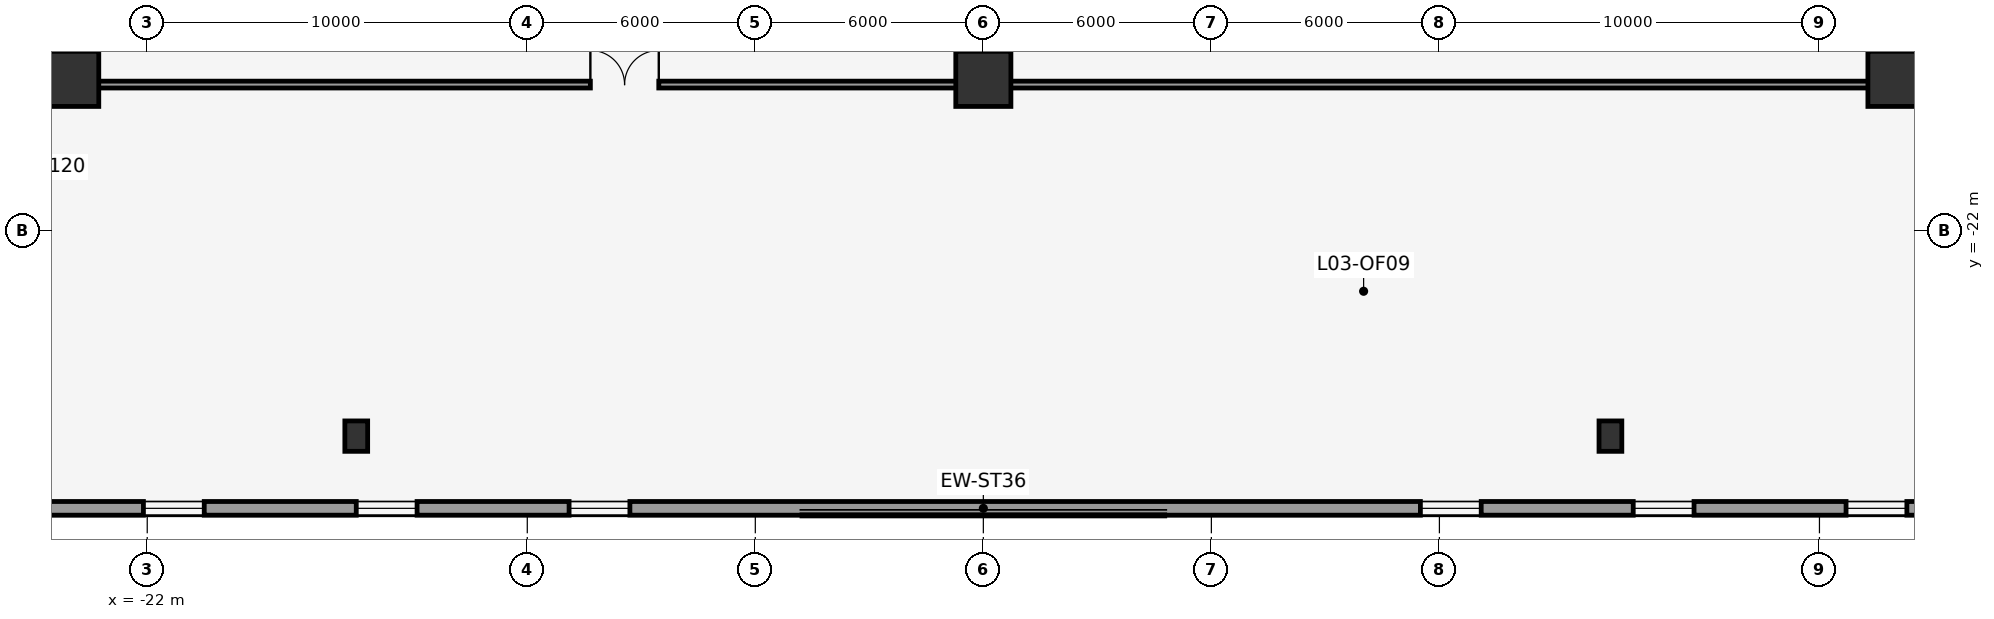
"""IFC4 building model, lengths in metres.
Left out: names, types, materials, properties, quantities, classifications, styles, units other than length and angle.
Written with IfcOpenShell. Run it as: python <this file> out.ifc"""

import sys

from ifc_helpers import new_model, si_unit, direction, frame, frame_2d, origin, origin_2d, place, context, subcontext, project, spatial, rectangle, hollow_rectangle, extrude, element, fill, save


model = new_model("IFC4")
c1 = context("Model", 3, precision=1e-05, world=origin(), true_north=direction((0.0, 1.0)))
c2 = subcontext(c1, "Body", "Model", "MODEL_VIEW")
j1 = project(units=[si_unit("LENGTHUNIT", "METRE"), si_unit("PLANEANGLEUNIT", "RADIAN")], contexts=[c1])
p1 = place(None, origin())
s1 = spatial("IfcSite", under=j1, at=p1, CompositionType="ELEMENT")
p2 = place(p1, origin())
s2 = spatial("IfcBuilding", under=s1, at=p2, CompositionType="ELEMENT")
p3 = place(p2, frame((0.0, 0.0, 17.5)))
s3 = spatial("IfcBuildingStorey", under=s2, at=p3, CompositionType="ELEMENT", Elevation=17.5)
for number, where, z_axis, x_axis in (
    (1, (-24.0, -18.0, 0.0), (0.0, 0.0, 1.0), (1.0, 0.0, 0.0)),
    (2, (24.0, -18.0, 0.0), (0.0, 0.0, 1.0), (1.0, 0.0, 0.0)),
    (3, (0.0, -18.0, 0.0), (0.0, 0.0, 1.0), (1.0, 0.0, 0.0)),
):
    element("IfcColumn", number, at=place(p3, frame(where, z_axis=z_axis, x_axis=x_axis)), inside=s3, PredefinedType="COLUMN", context=c2, shape_type="SweptSolid", body=[
        extrude(rectangle(XDim=1.45, YDim=1.45, at=origin_2d()), origin(), (0.0, 0.0, 1.0), 6.0),
    ])
for number, where, z_axis, x_axis in (
    (4, (-16.5, -27.4, 0.0), (0.0, 0.0, 1.0), (1.0, 0.0, 0.0)),
    (5, (16.5, -27.4, 0.0), (0.0, 0.0, 1.0), (1.0, 0.0, 0.0)),
):
    element("IfcColumn", number, at=place(p3, frame(where, z_axis=z_axis, x_axis=x_axis)), inside=s3, PredefinedType="COLUMN", context=c2, shape_type="SweptSolid", body=[
        extrude(hollow_rectangle(XDim=0.6, YDim=0.8, WallThickness=0.05, at=origin_2d()), origin(), (0.0, 0.0, 1.0), 6.0),
    ])
p4 = place(p3, frame((40.3, -29.3, 0.0), z_axis=(0.0, 0.0, 1.0), x_axis=(-1.0, 0.0, 0.0)))
e6 = element("IfcWall", 6, at=p4, inside=s3, PredefinedType="STANDARD", context=c2, shape_type="SweptSolid", body=[
    extrude(rectangle(XDim=80.6, YDim=0.36, at=frame_2d((40.3, 0.0))), origin(), (0.0, 0.0, 1.0), 5.7),
])
p5 = place(p4, frame((4.8, 0.0, 0.9)))
e7 = element("IfcOpeningElement", 7, at=p5, cuts=e6, PredefinedType="OPENING", context=c2, shape_type="SweptSolid", body=[
    extrude(rectangle(XDim=1.6, YDim=2.6, at=frame_2d((0.8, 1.3))), frame((0.0, 0.19, 0.0), z_axis=(0.0, -1.0, 0.0), x_axis=(1.0, 0.0, 0.0)), (0.0, 0.0, 1.0), 0.38),
])
p6 = place(p4, frame((10.4, 0.0, 0.9)))
e8 = element("IfcOpeningElement", 8, at=p6, cuts=e6, PredefinedType="OPENING", context=c2, shape_type="SweptSolid", body=[
    extrude(rectangle(XDim=1.6, YDim=2.6, at=frame_2d((0.8, 1.3))), frame((0.0, 0.19, 0.0), z_axis=(0.0, -1.0, 0.0), x_axis=(1.0, 0.0, 0.0)), (0.0, 0.0, 1.0), 0.38),
])
p7 = place(p4, frame((16.0, 0.0, 0.9)))
e9 = element("IfcOpeningElement", 9, at=p7, cuts=e6, PredefinedType="OPENING", context=c2, shape_type="SweptSolid", body=[
    extrude(rectangle(XDim=1.6, YDim=2.6, at=frame_2d((0.8, 1.3))), frame((0.0, 0.19, 0.0), z_axis=(0.0, -1.0, 0.0), x_axis=(1.0, 0.0, 0.0)), (0.0, 0.0, 1.0), 0.38),
])
p8 = place(p4, frame((21.6, 0.0, 0.9)))
e10 = element("IfcOpeningElement", 10, at=p8, cuts=e6, PredefinedType="OPENING", context=c2, shape_type="SweptSolid", body=[
    extrude(rectangle(XDim=1.6, YDim=2.6, at=frame_2d((0.8, 1.3))), frame((0.0, 0.19, 0.0), z_axis=(0.0, -1.0, 0.0), x_axis=(1.0, 0.0, 0.0)), (0.0, 0.0, 1.0), 0.38),
])
p9 = place(p4, frame((27.2, 0.0, 0.9)))
e11 = element("IfcOpeningElement", 11, at=p9, cuts=e6, PredefinedType="OPENING", context=c2, shape_type="SweptSolid", body=[
    extrude(rectangle(XDim=1.6, YDim=2.6, at=frame_2d((0.8, 1.3))), frame((0.0, 0.19, 0.0), z_axis=(0.0, -1.0, 0.0), x_axis=(1.0, 0.0, 0.0)), (0.0, 0.0, 1.0), 0.38),
])
p10 = place(p4, frame((49.6, 0.0, 0.9)))
e12 = element("IfcOpeningElement", 12, at=p10, cuts=e6, PredefinedType="OPENING", context=c2, shape_type="SweptSolid", body=[
    extrude(rectangle(XDim=1.6, YDim=2.6, at=frame_2d((0.8, 1.3))), frame((0.0, 0.19, 0.0), z_axis=(0.0, -1.0, 0.0), x_axis=(1.0, 0.0, 0.0)), (0.0, 0.0, 1.0), 0.38),
])
p11 = place(p4, frame((55.2, 0.0, 0.9)))
e13 = element("IfcOpeningElement", 13, at=p11, cuts=e6, PredefinedType="OPENING", context=c2, shape_type="SweptSolid", body=[
    extrude(rectangle(XDim=1.6, YDim=2.6, at=frame_2d((0.8, 1.3))), frame((0.0, 0.19, 0.0), z_axis=(0.0, -1.0, 0.0), x_axis=(1.0, 0.0, 0.0)), (0.0, 0.0, 1.0), 0.38),
])
p12 = place(p4, frame((60.8, 0.0, 0.9)))
e14 = element("IfcOpeningElement", 14, at=p12, cuts=e6, PredefinedType="OPENING", context=c2, shape_type="SweptSolid", body=[
    extrude(rectangle(XDim=1.6, YDim=2.6, at=frame_2d((0.8, 1.3))), frame((0.0, 0.19, 0.0), z_axis=(0.0, -1.0, 0.0), x_axis=(1.0, 0.0, 0.0)), (0.0, 0.0, 1.0), 0.38),
])
p13 = place(p4, frame((66.4, 0.0, 0.9)))
e15 = element("IfcOpeningElement", 15, at=p13, cuts=e6, PredefinedType="OPENING", context=c2, shape_type="SweptSolid", body=[
    extrude(rectangle(XDim=1.6, YDim=2.6, at=frame_2d((0.8, 1.3))), frame((0.0, 0.19, 0.0), z_axis=(0.0, -1.0, 0.0), x_axis=(1.0, 0.0, 0.0)), (0.0, 0.0, 1.0), 0.38),
])
p14 = place(p4, frame((72.0, 0.0, 0.9)))
e16 = element("IfcOpeningElement", 16, at=p14, cuts=e6, PredefinedType="OPENING", context=c2, shape_type="SweptSolid", body=[
    extrude(rectangle(XDim=1.6, YDim=2.6, at=frame_2d((0.8, 1.3))), frame((0.0, 0.19, 0.0), z_axis=(0.0, -1.0, 0.0), x_axis=(1.0, 0.0, 0.0)), (0.0, 0.0, 1.0), 0.38),
])
p15 = place(p3, frame((-23.6, -18.15, 0.0), z_axis=(0.0, 0.0, 1.0), x_axis=(1.0, 0.0, 0.0)))
e17 = element("IfcWall", 17, at=p15, inside=s3, PredefinedType="PARTITIONING", context=c2, shape_type="SweptSolid", body=[
    extrude(rectangle(XDim=47.2, YDim=0.18, at=frame_2d((23.6, 0.0))), origin(), (0.0, 0.0, 1.0), 3.88),
])
p16 = place(p15, frame((13.26, 0.0, 0.0)))
e18 = element("IfcOpeningElement", 18, at=p16, cuts=e17, PredefinedType="OPENING", context=c2, shape_type="SweptSolid", body=[
    extrude(rectangle(XDim=1.8, YDim=2.2, at=frame_2d((0.9, 1.1))), frame((0.0, 0.1, 0.0), z_axis=(0.0, -1.0, 0.0), x_axis=(1.0, 0.0, 0.0)), (0.0, 0.0, 1.0), 0.2),
])
p17 = place(p7, origin())
e19 = element("IfcWindow", 19, at=p17, inside=s3, PartitioningType="DOUBLE_PANEL_VERTICAL", PredefinedType="WINDOW", context=c2, shape_type="SweptSolid", body=[
    extrude(rectangle(XDim=1.6, YDim=2.6, at=frame_2d((0.8, 1.3))), frame((0.0, 0.03, 0.0), z_axis=(0.0, -1.0, 0.0), x_axis=(1.0, 0.0, 0.0)), (0.0, 0.0, 1.0), 0.06),
])
fill(e9, e19)
p18 = place(p8, origin())
e20 = element("IfcWindow", 20, at=p18, inside=s3, PartitioningType="DOUBLE_PANEL_VERTICAL", PredefinedType="WINDOW", context=c2, shape_type="SweptSolid", body=[
    extrude(rectangle(XDim=1.6, YDim=2.6, at=frame_2d((0.8, 1.3))), frame((0.0, 0.03, 0.0), z_axis=(0.0, -1.0, 0.0), x_axis=(1.0, 0.0, 0.0)), (0.0, 0.0, 1.0), 0.06),
])
fill(e10, e20)
p19 = place(p9, origin())
e21 = element("IfcWindow", 21, at=p19, inside=s3, PartitioningType="DOUBLE_PANEL_VERTICAL", PredefinedType="WINDOW", context=c2, shape_type="SweptSolid", body=[
    extrude(rectangle(XDim=1.6, YDim=2.6, at=frame_2d((0.8, 1.3))), frame((0.0, 0.03, 0.0), z_axis=(0.0, -1.0, 0.0), x_axis=(1.0, 0.0, 0.0)), (0.0, 0.0, 1.0), 0.06),
])
fill(e11, e21)
p20 = place(p10, origin())
e22 = element("IfcWindow", 22, at=p20, inside=s3, PartitioningType="DOUBLE_PANEL_VERTICAL", PredefinedType="WINDOW", context=c2, shape_type="SweptSolid", body=[
    extrude(rectangle(XDim=1.6, YDim=2.6, at=frame_2d((0.8, 1.3))), frame((0.0, 0.03, 0.0), z_axis=(0.0, -1.0, 0.0), x_axis=(1.0, 0.0, 0.0)), (0.0, 0.0, 1.0), 0.06),
])
fill(e12, e22)
p21 = place(p11, origin())
e23 = element("IfcWindow", 23, at=p21, inside=s3, PartitioningType="DOUBLE_PANEL_VERTICAL", PredefinedType="WINDOW", context=c2, shape_type="SweptSolid", body=[
    extrude(rectangle(XDim=1.6, YDim=2.6, at=frame_2d((0.8, 1.3))), frame((0.0, 0.03, 0.0), z_axis=(0.0, -1.0, 0.0), x_axis=(1.0, 0.0, 0.0)), (0.0, 0.0, 1.0), 0.06),
])
fill(e13, e23)
p22 = place(p12, origin())
e24 = element("IfcWindow", 24, at=p22, inside=s3, PartitioningType="DOUBLE_PANEL_VERTICAL", PredefinedType="WINDOW", context=c2, shape_type="SweptSolid", body=[
    extrude(rectangle(XDim=1.6, YDim=2.6, at=frame_2d((0.8, 1.3))), frame((0.0, 0.03, 0.0), z_axis=(0.0, -1.0, 0.0), x_axis=(1.0, 0.0, 0.0)), (0.0, 0.0, 1.0), 0.06),
])
fill(e14, e24)
p23 = place(p16, origin())
e25 = element("IfcDoor", 25, at=p23, inside=s3, OperationType="DOUBLE_DOOR_SINGLE_SWING", PredefinedType="DOOR", context=c2, shape_type="SweptSolid", body=[
    extrude(rectangle(XDim=1.8, YDim=2.2, at=frame_2d((0.9, 1.1))), frame((0.0, 0.025, 0.0), z_axis=(0.0, -1.0, 0.0), x_axis=(1.0, 0.0, 0.0)), (0.0, 0.0, 1.0), 0.05),
])
fill(e18, e25)
save(model, sys.argv[1])
